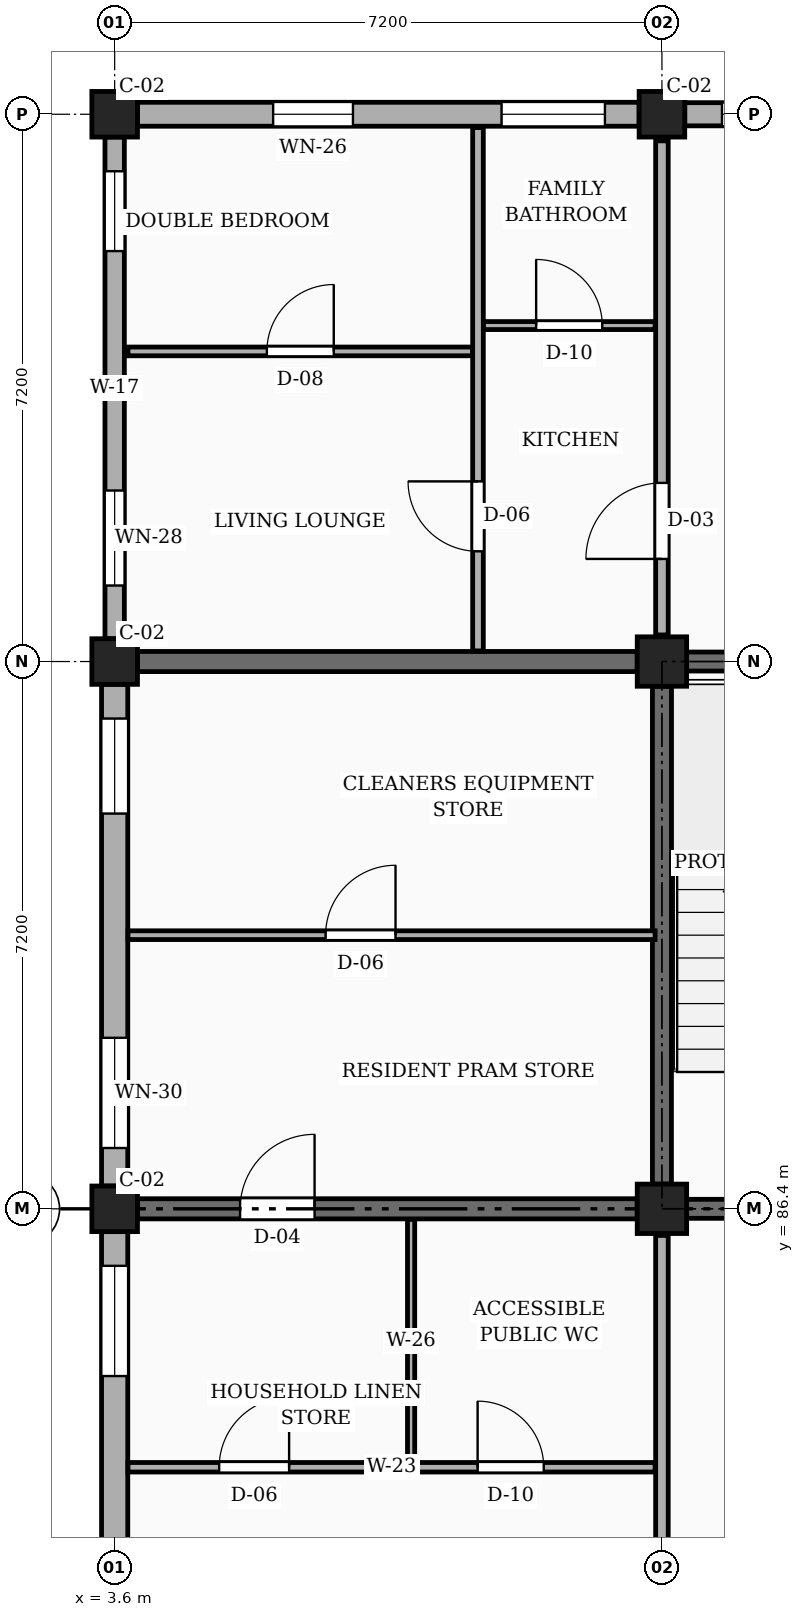
"""IFC4 building model, lengths in metres.
Left out: names, types, materials, properties, quantities, classifications, styles, units other than length and angle.
Written with IfcOpenShell. Run it as: python <this file> out.ifc"""

import sys

from ifc_helpers import new_model, si_unit, direction, frame, frame_2d, origin, origin_2d, place, context, subcontext, project, spatial, rectangle, extrude, element, fill, save


model = new_model("IFC4")
c1 = context("Model", 3, precision=1e-05, world=origin(), true_north=direction((0.0, 1.0)))
c2 = subcontext(c1, "Body", "Model", "MODEL_VIEW")
j1 = project(units=[si_unit("LENGTHUNIT", "METRE"), si_unit("PLANEANGLEUNIT", "RADIAN")], contexts=[c1])
p1 = place(None, origin())
s1 = spatial("IfcSite", under=j1, at=p1, CompositionType="ELEMENT")
p2 = place(p1, origin())
s2 = spatial("IfcBuilding", under=s1, at=p2, CompositionType="ELEMENT")
p3 = place(p2, frame((0.0, 0.0, 4.5)))
s3 = spatial("IfcBuildingStorey", under=s2, at=p3, CompositionType="ELEMENT", Elevation=4.5)
for number, where, z_axis, x_axis in (
    (1, (3.6, 86.4, 0.0), (0.0, 0.0, 1.0), (1.0, 0.0, 0.0)),
    (2, (3.6, 93.6, 0.0), (0.0, 0.0, 1.0), (1.0, 0.0, 0.0)),
    (3, (3.6, 100.8, 0.0), (0.0, 0.0, 1.0), (1.0, 0.0, 0.0)),
):
    element("IfcColumn", number, at=place(p3, frame(where, z_axis=z_axis, x_axis=x_axis)), inside=s3, PredefinedType="COLUMN", context=c2, shape_type="SweptSolid", body=[
        extrude(rectangle(XDim=0.6, YDim=0.6, at=origin_2d()), origin(), (0.0, 0.0, 1.0), 3.15),
    ])
for number, where, z_axis, x_axis in (
    (4, (10.8, 86.4, 0.0), (0.0, 0.0, 1.0), (1.0, 0.0, 0.0)),
    (5, (10.8, 93.6, 0.0), (0.0, 0.0, 1.0), (1.0, 0.0, 0.0)),
):
    element("IfcColumn", number, at=place(p3, frame(where, z_axis=z_axis, x_axis=x_axis)), inside=s3, PredefinedType="COLUMN", context=c2, shape_type="SweptSolid", body=[
        extrude(rectangle(XDim=0.65, YDim=0.65, at=origin_2d()), origin(), (0.0, 0.0, 1.0), 3.15),
    ])
p4 = place(p3, frame((10.8, 100.8, 0.0), z_axis=(0.0, 0.0, 1.0), x_axis=(1.0, 0.0, 0.0)))
e6 = element("IfcColumn", 6, at=p4, inside=s3, PredefinedType="COLUMN", context=c2, shape_type="SweptSolid", body=[
    extrude(rectangle(XDim=0.6, YDim=0.6, at=origin_2d()), origin(), (0.0, 0.0, 1.0), 3.15),
])
p5 = place(p3, frame((3.9, 86.4, 0.0), z_axis=(0.0, 0.0, 1.0), x_axis=(1.0, 0.0, 0.0)))
e7 = element("IfcWall", 7, at=p5, inside=s3, PredefinedType="SOLIDWALL", context=c2, shape_type="SweptSolid", body=[
    extrude(rectangle(XDim=6.575, YDim=0.265, at=frame_2d((3.288, 0.0))), origin(), (0.0, 0.0, 1.0), 2.21),
])
p6 = place(p5, frame((1.35, 0.0, 0.0)))
e8 = element("IfcOpeningElement", 8, at=p6, cuts=e7, PredefinedType="OPENING", context=c2, shape_type="SweptSolid", body=[
    extrude(rectangle(XDim=0.98, YDim=2.12, at=frame_2d((0.49, 1.06))), frame((0.0, 0.143, 0.0), z_axis=(0.0, -1.0, 0.0), x_axis=(1.0, 0.0, 0.0)), (0.0, 0.0, 1.0), 0.285),
])
p7 = place(p3, frame((3.9, 93.6, 0.0), z_axis=(0.0, 0.0, 1.0), x_axis=(1.0, 0.0, 0.0)))
e9 = element("IfcWall", 9, at=p7, inside=s3, PredefinedType="SOLIDWALL", context=c2, shape_type="SweptSolid", body=[
    extrude(rectangle(XDim=6.575, YDim=0.265, at=frame_2d((3.288, 0.0))), origin(), (0.0, 0.0, 1.0), 2.21),
])
p8 = place(p3, frame((17.7, 100.8, 0.0), z_axis=(0.0, 0.0, 1.0), x_axis=(-1.0, 0.0, 0.0)))
e10 = element("IfcWall", 10, at=p8, inside=s3, PredefinedType="SOLIDWALL", context=c2, shape_type="SweptSolid", body=[
    extrude(rectangle(XDim=6.6, YDim=0.305, at=frame_2d((3.3, 0.0))), origin(), (0.0, 0.0, 1.0), 2.48),
])
p9 = place(p8, frame((0.45, 0.0, 0.78)))
e11 = element("IfcOpeningElement", 11, at=p9, cuts=e10, PredefinedType="OPENING", context=c2, shape_type="SweptSolid", body=[
    extrude(rectangle(XDim=1.3, YDim=1.36, at=frame_2d((0.65, 0.68))), frame((0.0, 0.163, 0.0), z_axis=(0.0, -1.0, 0.0), x_axis=(1.0, 0.0, 0.0)), (0.0, 0.0, 1.0), 0.325),
])
p10 = place(p8, frame((4.65, 0.0, 0.78)))
e12 = element("IfcOpeningElement", 12, at=p10, cuts=e10, PredefinedType="OPENING", context=c2, shape_type="SweptSolid", body=[
    extrude(rectangle(XDim=1.46, YDim=1.36, at=frame_2d((0.73, 0.68))), frame((0.0, 0.163, 0.0), z_axis=(0.0, -1.0, 0.0), x_axis=(1.0, 0.0, 0.0)), (0.0, 0.0, 1.0), 0.325),
])
p11 = place(p3, frame((10.5, 100.8, 0.0), z_axis=(0.0, 0.0, 1.0), x_axis=(-1.0, 0.0, 0.0)))
e13 = element("IfcWall", 13, at=p11, inside=s3, PredefinedType="SOLIDWALL", context=c2, shape_type="SweptSolid", body=[
    extrude(rectangle(XDim=6.6, YDim=0.315, at=frame_2d((3.3, 0.0))), origin(), (0.0, 0.0, 1.0), 2.48),
])
p12 = place(p11, frame((0.45, 0.0, 0.78)))
e14 = element("IfcOpeningElement", 14, at=p12, cuts=e13, PredefinedType="OPENING", context=c2, shape_type="SweptSolid", body=[
    extrude(rectangle(XDim=1.36, YDim=1.26, at=frame_2d((0.68, 0.63))), frame((0.0, 0.167, 0.0), z_axis=(0.0, -1.0, 0.0), x_axis=(1.0, 0.0, 0.0)), (0.0, 0.0, 1.0), 0.335),
])
p13 = place(p11, frame((3.765, 0.0, 0.78)))
e15 = element("IfcOpeningElement", 15, at=p13, cuts=e13, PredefinedType="OPENING", context=c2, shape_type="SweptSolid", body=[
    extrude(rectangle(XDim=1.05, YDim=1.44, at=frame_2d((0.525, 0.72))), frame((0.0, 0.167, 0.0), z_axis=(0.0, -1.0, 0.0), x_axis=(1.0, 0.0, 0.0)), (0.0, 0.0, 1.0), 0.335),
])
p14 = place(p3, frame((3.6, 100.5, 0.0), z_axis=(0.0, 0.0, 1.0), x_axis=(0.0, -1.0, 0.0)))
e16 = element("IfcWall", 16, at=p14, inside=s3, PredefinedType="SOLIDWALL", context=c2, shape_type="SweptSolid", body=[
    extrude(rectangle(XDim=6.6, YDim=0.255, at=frame_2d((3.3, 0.0))), origin(), (0.0, 0.0, 1.0), 2.48),
])
p15 = place(p14, frame((0.45, 0.0, 0.78)))
e17 = element("IfcOpeningElement", 17, at=p15, cuts=e16, PredefinedType="OPENING", context=c2, shape_type="SweptSolid", body=[
    extrude(rectangle(XDim=1.05, YDim=1.44, at=frame_2d((0.525, 0.72))), frame((0.0, 0.137, 0.0), z_axis=(0.0, -1.0, 0.0), x_axis=(1.0, 0.0, 0.0)), (0.0, 0.0, 1.0), 0.275),
])
p16 = place(p14, frame((4.65, 0.0, 0.78)))
e18 = element("IfcOpeningElement", 18, at=p16, cuts=e16, PredefinedType="OPENING", context=c2, shape_type="SweptSolid", body=[
    extrude(rectangle(XDim=1.25, YDim=1.44, at=frame_2d((0.625, 0.72))), frame((0.0, 0.137, 0.0), z_axis=(0.0, -1.0, 0.0), x_axis=(1.0, 0.0, 0.0)), (0.0, 0.0, 1.0), 0.275),
])
p17 = place(p3, frame((3.6, 93.3, 0.0), z_axis=(0.0, 0.0, 1.0), x_axis=(0.0, -1.0, 0.0)))
e19 = element("IfcWall", 19, at=p17, inside=s3, PredefinedType="SOLIDWALL", context=c2, shape_type="SweptSolid", body=[
    extrude(rectangle(XDim=6.6, YDim=0.345, at=frame_2d((3.3, 0.0))), origin(), (0.0, 0.0, 1.0), 2.48),
])
p18 = place(p17, frame((0.45, 0.0, 0.78)))
e20 = element("IfcOpeningElement", 20, at=p18, cuts=e19, PredefinedType="OPENING", context=c2, shape_type="SweptSolid", body=[
    extrude(rectangle(XDim=1.25, YDim=1.44, at=frame_2d((0.625, 0.72))), frame((0.0, 0.183, 0.0), z_axis=(0.0, -1.0, 0.0), x_axis=(1.0, 0.0, 0.0)), (0.0, 0.0, 1.0), 0.365),
])
p19 = place(p17, frame((4.65, 0.0, 0.78)))
e21 = element("IfcOpeningElement", 21, at=p19, cuts=e19, PredefinedType="OPENING", context=c2, shape_type="SweptSolid", body=[
    extrude(rectangle(XDim=1.45, YDim=1.44, at=frame_2d((0.725, 0.72))), frame((0.0, 0.183, 0.0), z_axis=(0.0, -1.0, 0.0), x_axis=(1.0, 0.0, 0.0)), (0.0, 0.0, 1.0), 0.365),
])
p20 = place(p3, frame((3.6, 86.1, 0.0), z_axis=(0.0, 0.0, 1.0), x_axis=(0.0, -1.0, 0.0)))
e22 = element("IfcWall", 22, at=p20, inside=s3, PredefinedType="SOLIDWALL", context=c2, shape_type="SweptSolid", body=[
    extrude(rectangle(XDim=6.6, YDim=0.345, at=frame_2d((3.3, 0.0))), origin(), (0.0, 0.0, 1.0), 2.48),
])
p21 = place(p20, frame((0.45, 0.0, 0.78)))
e23 = element("IfcOpeningElement", 23, at=p21, cuts=e22, PredefinedType="OPENING", context=c2, shape_type="SweptSolid", body=[
    extrude(rectangle(XDim=1.45, YDim=1.44, at=frame_2d((0.725, 0.72))), frame((0.0, 0.183, 0.0), z_axis=(0.0, -1.0, 0.0), x_axis=(1.0, 0.0, 0.0)), (0.0, 0.0, 1.0), 0.365),
])
p22 = place(p20, frame((4.65, 0.0, 0.78)))
e24 = element("IfcOpeningElement", 24, at=p22, cuts=e22, PredefinedType="OPENING", context=c2, shape_type="SweptSolid", body=[
    extrude(rectangle(XDim=0.92, YDim=1.15, at=frame_2d((0.46, 0.575))), frame((0.0, 0.183, 0.0), z_axis=(0.0, -1.0, 0.0), x_axis=(1.0, 0.0, 0.0)), (0.0, 0.0, 1.0), 0.365),
])
p23 = place(p3, frame((10.8, 86.725, 0.0), z_axis=(0.0, 0.0, 1.0), x_axis=(0.0, 1.0, 0.0)))
e25 = element("IfcWall", 25, at=p23, inside=s3, PredefinedType="SHEAR", context=c2, shape_type="SweptSolid", body=[
    extrude(rectangle(XDim=6.55, YDim=0.25, at=frame_2d((3.275, 0.0))), origin(), (0.0, 0.0, 1.0), 2.91),
])
for number, where, z_axis, x_axis in (
    (26, (11.125, 93.6, 0.0), (0.0, 0.0, 1.0), (1.0, 0.0, 0.0)),
    (27, (11.125, 86.4, 0.0), (0.0, 0.0, 1.0), (1.0, 0.0, 0.0)),
):
    element("IfcWall", number, at=place(p3, frame(where, z_axis=z_axis, x_axis=x_axis)), inside=s3, PredefinedType="SHEAR", context=c2, shape_type="SweptSolid", body=[
        extrude(rectangle(XDim=6.55, YDim=0.25, at=frame_2d((3.275, 0.0))), origin(), (0.0, 0.0, 1.0), 2.91),
    ])
p24 = place(p3, frame((10.8, 79.55, 0.0), z_axis=(0.0, 0.0, 1.0), x_axis=(0.0, 1.0, 0.0)))
e28 = element("IfcWall", 28, at=p24, inside=s3, PredefinedType="PARTITIONING", context=c2, shape_type="SweptSolid", body=[
    extrude(rectangle(XDim=6.5, YDim=0.165, at=frame_2d((3.25, 0.0))), origin(), (0.0, 0.0, 1.0), 2.26),
])
p25 = place(p24, frame((1.1, 0.0, 0.0)))
e29 = element("IfcOpeningElement", 29, at=p25, cuts=e28, PredefinedType="OPENING", context=c2, shape_type="SweptSolid", body=[
    extrude(rectangle(XDim=1.14, YDim=2.18, at=frame_2d((0.57, 1.09))), frame((0.0, 0.093, 0.0), z_axis=(0.0, -1.0, 0.0), x_axis=(1.0, 0.0, 0.0)), (0.0, 0.0, 1.0), 0.185),
])
p26 = place(p3, frame((10.8, 93.95, 0.0), z_axis=(0.0, 0.0, 1.0), x_axis=(0.0, 1.0, 0.0)))
e30 = element("IfcWall", 30, at=p26, inside=s3, PredefinedType="PARTITIONING", context=c2, shape_type="SweptSolid", body=[
    extrude(rectangle(XDim=6.5, YDim=0.165, at=frame_2d((3.25, 0.0))), origin(), (0.0, 0.0, 1.0), 2.26),
])
p27 = place(p26, frame((1.0, 0.0, 0.0)))
e31 = element("IfcOpeningElement", 31, at=p27, cuts=e30, PredefinedType="OPENING", context=c2, shape_type="SweptSolid", body=[
    extrude(rectangle(XDim=1.0, YDim=2.15, at=frame_2d((0.5, 1.075))), frame((0.0, 0.093, 0.0), z_axis=(0.0, -1.0, 0.0), x_axis=(1.0, 0.0, 0.0)), (0.0, 0.0, 1.0), 0.185),
])
p28 = place(p3, frame((3.775, 83.0, 0.0), z_axis=(0.0, 0.0, 1.0), x_axis=(1.0, 0.0, 0.0)))
e32 = element("IfcWall", 32, at=p28, inside=s3, PredefinedType="PARTITIONING", context=c2, shape_type="SweptSolid", body=[
    extrude(rectangle(XDim=6.935, YDim=0.125, at=frame_2d((3.468, 0.0))), origin(), (0.0, 0.0, 1.0), 2.345),
])
p29 = place(p28, frame((4.6, 0.0, 0.0)))
e33 = element("IfcOpeningElement", 33, at=p29, cuts=e32, PredefinedType="OPENING", context=c2, shape_type="SweptSolid", body=[
    extrude(rectangle(XDim=0.87, YDim=2.05, at=frame_2d((0.435, 1.025))), frame((0.0, 0.073, 0.0), z_axis=(0.0, -1.0, 0.0), x_axis=(1.0, 0.0, 0.0)), (0.0, 0.0, 1.0), 0.145),
])
p30 = place(p28, frame((1.2, 0.0, 0.0)))
e34 = element("IfcOpeningElement", 34, at=p30, cuts=e32, PredefinedType="OPENING", context=c2, shape_type="SweptSolid", body=[
    extrude(rectangle(XDim=0.92, YDim=2.1, at=frame_2d((0.46, 1.05))), frame((0.0, 0.073, 0.0), z_axis=(0.0, -1.0, 0.0), x_axis=(1.0, 0.0, 0.0)), (0.0, 0.0, 1.0), 0.145),
])
p31 = place(p3, frame((7.5, 83.07, 0.0), z_axis=(0.0, 0.0, 1.0), x_axis=(0.0, 1.0, 0.0)))
e35 = element("IfcWall", 35, at=p31, inside=s3, PredefinedType="PARTITIONING", context=c2, shape_type="SweptSolid", body=[
    extrude(rectangle(XDim=3.19, YDim=0.095, at=frame_2d((1.595, 0.0))), origin(), (0.0, 0.0, 1.0), 2.345),
])
p32 = place(p3, frame((3.775, 90.0, 0.0), z_axis=(0.0, 0.0, 1.0), x_axis=(1.0, 0.0, 0.0)))
e36 = element("IfcWall", 36, at=p32, inside=s3, PredefinedType="PARTITIONING", context=c2, shape_type="SweptSolid", body=[
    extrude(rectangle(XDim=6.935, YDim=0.115, at=frame_2d((3.468, 0.0))), origin(), (0.0, 0.0, 1.0), 2.345),
])
p33 = place(p32, frame((2.6, 0.0, 0.0)))
e37 = element("IfcOpeningElement", 37, at=p33, cuts=e36, PredefinedType="OPENING", context=c2, shape_type="SweptSolid", body=[
    extrude(rectangle(XDim=0.92, YDim=2.1, at=frame_2d((0.46, 1.05))), frame((0.0, 0.067, 0.0), z_axis=(0.0, -1.0, 0.0), x_axis=(1.0, 0.0, 0.0)), (0.0, 0.0, 1.0), 0.135),
])
p34 = place(p3, frame((3.775, 97.68, 0.0), z_axis=(0.0, 0.0, 1.0), x_axis=(1.0, 0.0, 0.0)))
e38 = element("IfcWall", 38, at=p34, inside=s3, PredefinedType="PARTITIONING", context=c2, shape_type="SweptSolid", body=[
    extrude(rectangle(XDim=4.535, YDim=0.115, at=frame_2d((2.268, 0.0))), origin(), (0.0, 0.0, 1.0), 2.345),
])
p35 = place(p34, frame((1.827, 0.0, 0.0)))
e39 = element("IfcOpeningElement", 39, at=p35, cuts=e38, PredefinedType="OPENING", context=c2, shape_type="SweptSolid", body=[
    extrude(rectangle(XDim=0.88, YDim=2.08, at=frame_2d((0.44, 1.04))), frame((0.0, 0.067, 0.0), z_axis=(0.0, -1.0, 0.0), x_axis=(1.0, 0.0, 0.0)), (0.0, 0.0, 1.0), 0.135),
])
p36 = place(p3, frame((8.45, 98.02, 0.0), z_axis=(0.0, 0.0, 1.0), x_axis=(1.0, 0.0, 0.0)))
e40 = element("IfcWall", 40, at=p36, inside=s3, PredefinedType="PARTITIONING", context=c2, shape_type="SweptSolid", body=[
    extrude(rectangle(XDim=2.26, YDim=0.105, at=frame_2d((1.13, 0.0))), origin(), (0.0, 0.0, 1.0), 2.345),
])
p37 = place(p36, frame((0.695, 0.0, 0.0)))
e41 = element("IfcOpeningElement", 41, at=p37, cuts=e40, PredefinedType="OPENING", context=c2, shape_type="SweptSolid", body=[
    extrude(rectangle(XDim=0.87, YDim=2.05, at=frame_2d((0.435, 1.025))), frame((0.0, 0.062, 0.0), z_axis=(0.0, -1.0, 0.0), x_axis=(1.0, 0.0, 0.0)), (0.0, 0.0, 1.0), 0.125),
])
p38 = place(p3, frame((8.38, 93.74, 0.0), z_axis=(0.0, 0.0, 1.0), x_axis=(0.0, 1.0, 0.0)))
e42 = element("IfcWall", 42, at=p38, inside=s3, PredefinedType="PARTITIONING", context=c2, shape_type="SweptSolid", body=[
    extrude(rectangle(XDim=6.885, YDim=0.14, at=frame_2d((3.442, 0.0))), origin(), (0.0, 0.0, 1.0), 2.345),
])
p39 = place(p38, frame((1.31, 0.0, 0.0)))
e43 = element("IfcOpeningElement", 43, at=p39, cuts=e42, PredefinedType="OPENING", context=c2, shape_type="SweptSolid", body=[
    extrude(rectangle(XDim=0.92, YDim=2.1, at=frame_2d((0.46, 1.05))), frame((0.0, 0.08, 0.0), z_axis=(0.0, -1.0, 0.0), x_axis=(1.0, 0.0, 0.0)), (0.0, 0.0, 1.0), 0.16),
])
p40 = place(p10, origin())
e44 = element("IfcWindow", 44, at=p40, inside=s3, PartitioningType="SINGLE_PANEL", PredefinedType="WINDOW", context=c2, shape_type="SweptSolid", body=[
    extrude(rectangle(XDim=1.46, YDim=1.36, at=frame_2d((0.73, 0.68))), frame((0.0, 0.03, 0.0), z_axis=(0.0, -1.0, 0.0), x_axis=(1.0, 0.0, 0.0)), (0.0, 0.0, 1.0), 0.06),
])
fill(e12, e44)
p41 = place(p12, origin())
e45 = element("IfcWindow", 45, at=p41, inside=s3, PartitioningType="SINGLE_PANEL", PredefinedType="WINDOW", context=c2, shape_type="SweptSolid", body=[
    extrude(rectangle(XDim=1.36, YDim=1.26, at=frame_2d((0.68, 0.63))), frame((0.0, 0.03, 0.0), z_axis=(0.0, -1.0, 0.0), x_axis=(1.0, 0.0, 0.0)), (0.0, 0.0, 1.0), 0.06),
])
fill(e14, e45)
p42 = place(p13, origin())
e46 = element("IfcWindow", 46, at=p42, inside=s3, PartitioningType="SINGLE_PANEL", PredefinedType="WINDOW", context=c2, shape_type="SweptSolid", body=[
    extrude(rectangle(XDim=1.05, YDim=1.44, at=frame_2d((0.525, 0.72))), frame((0.0, 0.03, 0.0), z_axis=(0.0, -1.0, 0.0), x_axis=(1.0, 0.0, 0.0)), (0.0, 0.0, 1.0), 0.06),
])
fill(e15, e46)
p43 = place(p15, origin())
e47 = element("IfcWindow", 47, at=p43, inside=s3, PartitioningType="SINGLE_PANEL", PredefinedType="WINDOW", context=c2, shape_type="SweptSolid", body=[
    extrude(rectangle(XDim=1.05, YDim=1.44, at=frame_2d((0.525, 0.72))), frame((0.0, 0.03, 0.0), z_axis=(0.0, -1.0, 0.0), x_axis=(1.0, 0.0, 0.0)), (0.0, 0.0, 1.0), 0.06),
])
fill(e17, e47)
p44 = place(p16, origin())
e48 = element("IfcWindow", 48, at=p44, inside=s3, PartitioningType="SINGLE_PANEL", PredefinedType="WINDOW", context=c2, shape_type="SweptSolid", body=[
    extrude(rectangle(XDim=1.25, YDim=1.44, at=frame_2d((0.625, 0.72))), frame((0.0, 0.03, 0.0), z_axis=(0.0, -1.0, 0.0), x_axis=(1.0, 0.0, 0.0)), (0.0, 0.0, 1.0), 0.06),
])
fill(e18, e48)
p45 = place(p18, origin())
e49 = element("IfcWindow", 49, at=p45, inside=s3, PartitioningType="SINGLE_PANEL", PredefinedType="WINDOW", context=c2, shape_type="SweptSolid", body=[
    extrude(rectangle(XDim=1.25, YDim=1.44, at=frame_2d((0.625, 0.72))), frame((0.0, 0.03, 0.0), z_axis=(0.0, -1.0, 0.0), x_axis=(1.0, 0.0, 0.0)), (0.0, 0.0, 1.0), 0.06),
])
fill(e20, e49)
p46 = place(p19, origin())
e50 = element("IfcWindow", 50, at=p46, inside=s3, PartitioningType="SINGLE_PANEL", PredefinedType="WINDOW", context=c2, shape_type="SweptSolid", body=[
    extrude(rectangle(XDim=1.45, YDim=1.44, at=frame_2d((0.725, 0.72))), frame((0.0, 0.03, 0.0), z_axis=(0.0, -1.0, 0.0), x_axis=(1.0, 0.0, 0.0)), (0.0, 0.0, 1.0), 0.06),
])
fill(e21, e50)
p47 = place(p21, origin())
e51 = element("IfcWindow", 51, at=p47, inside=s3, PartitioningType="SINGLE_PANEL", PredefinedType="WINDOW", context=c2, shape_type="SweptSolid", body=[
    extrude(rectangle(XDim=1.45, YDim=1.44, at=frame_2d((0.725, 0.72))), frame((0.0, 0.03, 0.0), z_axis=(0.0, -1.0, 0.0), x_axis=(1.0, 0.0, 0.0)), (0.0, 0.0, 1.0), 0.06),
])
fill(e23, e51)
p48 = place(p27, origin())
e52 = element("IfcDoor", 52, at=p48, inside=s3, OperationType="SINGLE_SWING_LEFT", PredefinedType="DOOR", context=c2, shape_type="SweptSolid", body=[
    extrude(rectangle(XDim=1.0, YDim=2.15, at=frame_2d((0.5, 1.075))), frame((0.0, 0.025, 0.0), z_axis=(0.0, -1.0, 0.0), x_axis=(1.0, 0.0, 0.0)), (0.0, 0.0, 1.0), 0.05),
])
fill(e31, e52)
p49 = place(p29, origin())
e53 = element("IfcDoor", 53, at=p49, inside=s3, OperationType="SINGLE_SWING_LEFT", PredefinedType="DOOR", context=c2, shape_type="SweptSolid", body=[
    extrude(rectangle(XDim=0.87, YDim=2.05, at=frame_2d((0.435, 1.025))), frame((0.0, 0.025, 0.0), z_axis=(0.0, -1.0, 0.0), x_axis=(1.0, 0.0, 0.0)), (0.0, 0.0, 1.0), 0.05),
])
fill(e33, e53)
p50 = place(p30, origin())
e54 = element("IfcDoor", 54, at=p50, inside=s3, OperationType="SINGLE_SWING_RIGHT", PredefinedType="DOOR", context=c2, shape_type="SweptSolid", body=[
    extrude(rectangle(XDim=0.92, YDim=2.1, at=frame_2d((0.46, 1.05))), frame((0.0, 0.025, 0.0), z_axis=(0.0, -1.0, 0.0), x_axis=(1.0, 0.0, 0.0)), (0.0, 0.0, 1.0), 0.05),
])
fill(e34, e54)
p51 = place(p33, origin())
e55 = element("IfcDoor", 55, at=p51, inside=s3, OperationType="SINGLE_SWING_RIGHT", PredefinedType="DOOR", context=c2, shape_type="SweptSolid", body=[
    extrude(rectangle(XDim=0.92, YDim=2.1, at=frame_2d((0.46, 1.05))), frame((0.0, 0.025, 0.0), z_axis=(0.0, -1.0, 0.0), x_axis=(1.0, 0.0, 0.0)), (0.0, 0.0, 1.0), 0.05),
])
fill(e37, e55)
p52 = place(p35, origin())
e56 = element("IfcDoor", 56, at=p52, inside=s3, OperationType="SINGLE_SWING_RIGHT", PredefinedType="DOOR", context=c2, shape_type="SweptSolid", body=[
    extrude(rectangle(XDim=0.88, YDim=2.08, at=frame_2d((0.44, 1.04))), frame((0.0, 0.025, 0.0), z_axis=(0.0, -1.0, 0.0), x_axis=(1.0, 0.0, 0.0)), (0.0, 0.0, 1.0), 0.05),
])
fill(e39, e56)
p53 = place(p37, origin())
e57 = element("IfcDoor", 57, at=p53, inside=s3, OperationType="SINGLE_SWING_LEFT", PredefinedType="DOOR", context=c2, shape_type="SweptSolid", body=[
    extrude(rectangle(XDim=0.87, YDim=2.05, at=frame_2d((0.435, 1.025))), frame((0.0, 0.025, 0.0), z_axis=(0.0, -1.0, 0.0), x_axis=(1.0, 0.0, 0.0)), (0.0, 0.0, 1.0), 0.05),
])
fill(e41, e57)
p54 = place(p39, origin())
e58 = element("IfcDoor", 58, at=p54, inside=s3, OperationType="SINGLE_SWING_RIGHT", PredefinedType="DOOR", context=c2, shape_type="SweptSolid", body=[
    extrude(rectangle(XDim=0.92, YDim=2.1, at=frame_2d((0.46, 1.05))), frame((0.0, 0.025, 0.0), z_axis=(0.0, -1.0, 0.0), x_axis=(1.0, 0.0, 0.0)), (0.0, 0.0, 1.0), 0.05),
])
fill(e43, e58)
p55 = place(p6, origin())
e59 = element("IfcDoor", 59, at=p55, inside=s3, OperationType="SINGLE_SWING_RIGHT", PredefinedType="DOOR", context=c2, shape_type="SweptSolid", body=[
    extrude(rectangle(XDim=0.98, YDim=2.12, at=frame_2d((0.49, 1.06))), frame((0.0, 0.025, 0.0), z_axis=(0.0, -1.0, 0.0), x_axis=(1.0, 0.0, 0.0)), (0.0, 0.0, 1.0), 0.05),
])
fill(e8, e59)
save(model, sys.argv[1])
